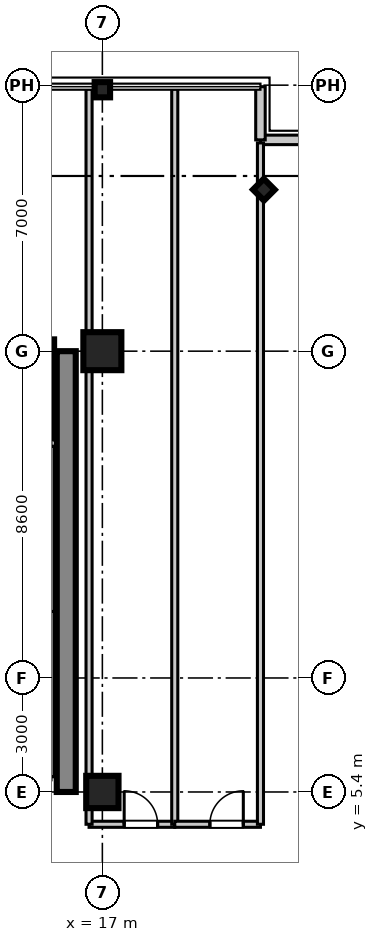
"""IFC4 building model, lengths in metres.
Left out: names, types, materials, properties, quantities, classifications, styles, units other than length and angle.
Written with IfcOpenShell. Run it as: python <this file> out.ifc"""

import sys

from ifc_helpers import new_model, si_unit, direction, frame, frame_2d, origin, origin_2d, place, context, subcontext, project, spatial, rectangle, i_section, extrude, source, transform, mapped, element, fill, save


model = new_model("IFC4")
c1 = context("Model", 3, precision=1e-05, world=origin(), true_north=direction((0.0, 1.0)))
c2 = subcontext(c1, "Body", "Model", "MODEL_VIEW")
j1 = project(units=[si_unit("LENGTHUNIT", "METRE"), si_unit("PLANEANGLEUNIT", "RADIAN")], contexts=[c1])
p1 = place(None, origin())
s1 = spatial("IfcSite", under=j1, at=p1, CompositionType="ELEMENT")
p2 = place(p1, origin())
s2 = spatial("IfcBuilding", under=s1, at=p2, CompositionType="ELEMENT")
p3 = place(p2, frame((0.0, 0.0, 219.7)))
s3 = spatial("IfcBuildingStorey", under=s2, at=p3, CompositionType="ELEMENT", Elevation=219.7)
m1 = source(origin(), c2, "Body", "SweptSolid", [
    extrude(rectangle(XDim=0.85, YDim=0.85, at=origin_2d()), origin(), (0.0, 0.0, 1.0), 3.655),
])
p4 = place(p3, frame((17.0, 5.4, 0.0), z_axis=(0.0, 0.0, 1.0), x_axis=(1.0, 0.0, 0.0)))
e1 = element("IfcColumn", 1, at=p4, inside=s3, PredefinedType="PILASTER", context=c2, shape_type="MappedRepresentation", body=[
    mapped(m1, transform((0.0, 0.0, 0.0), scale=1.0)),
])
m2 = source(origin(), c2, "Body", "SweptSolid", [
    extrude(rectangle(XDim=1.0, YDim=1.0, at=origin_2d()), origin(), (0.0, 0.0, 1.0), 3.655),
])
p5 = place(p3, frame((17.0, 17.0, 0.0), z_axis=(0.0, 0.0, 1.0), x_axis=(1.0, 0.0, 0.0)))
e2 = element("IfcColumn", 2, at=p5, inside=s3, PredefinedType="COLUMN", context=c2, shape_type="MappedRepresentation", body=[
    mapped(m2, transform((0.0, 0.0, 0.0), scale=1.0)),
])
m3 = source(origin(), c2, "Body", "SweptSolid", [
    extrude(i_section(OverallWidth=0.401, OverallDepth=0.406, WebThickness=0.016, FlangeThickness=0.025, at=origin_2d()), origin(), (0.0, 0.0, 1.0), 3.655),
])
for number, where, z_axis, x_axis in (
    (3, (17.0, 23.88, 0.0), (0.0, 0.0, 1.0), (0.0, 1.0, 0.0)),
    (4, (21.25, 21.25, 0.0), (0.0, 0.0, 1.0), (0.707, 0.707, 0.0)),
):
    element("IfcColumn", number, at=place(p3, frame(where, z_axis=z_axis, x_axis=x_axis)), inside=s3, PredefinedType="COLUMN", context=c2, shape_type="MappedRepresentation", body=[
        mapped(m3, transform((0.0, 0.0, 0.0), scale=1.0)),
    ])
m4 = source(origin(), c2, "Body", "SweptSolid", [
    extrude(rectangle(XDim=11.6, YDim=0.5, at=frame_2d((5.8, 0.0))), origin(), (0.0, 0.0, 1.0), 3.41),
])
p6 = place(p3, frame((16.05, 5.4, 0.0), z_axis=(0.0, 0.0, 1.0), x_axis=(0.0, 1.0, 0.0)))
e5 = element("IfcWall", 5, at=p6, inside=s3, PredefinedType="SHEAR", context=c2, shape_type="MappedRepresentation", body=[
    mapped(m4, transform((0.0, 0.0, 0.0), scale=1.0)),
])
m5 = source(origin(), c2, "Body", "SweptSolid", [
    extrude(rectangle(XDim=2.61, YDim=0.22, at=frame_2d((1.305, 0.0))), origin(), (0.0, 0.0, 1.0), 3.41),
])
p7 = place(p3, frame((15.62, 14.7, 0.0), z_axis=(0.0, 0.0, 1.0), x_axis=(0.0, 1.0, 0.0)))
e6 = element("IfcWall", 6, at=p7, inside=s3, PredefinedType="SHEAR", context=c2, shape_type="MappedRepresentation", body=[
    mapped(m5, transform((0.0, 0.0, 0.0), scale=1.0)),
])
m6 = source(origin(), c2, "Body", "SweptSolid", [
    extrude(rectangle(XDim=1.4, YDim=0.25, at=frame_2d((0.7, 0.0))), origin(), (0.0, 0.0, 1.0), 3.41),
])
p8 = place(p3, frame((21.16, 22.56, 0.0), z_axis=(0.0, 0.0, 1.0), x_axis=(1.0, 0.0, 0.0)))
e7 = element("IfcWall", 7, at=p8, inside=s3, PredefinedType="STANDARD", context=c2, shape_type="MappedRepresentation", body=[
    mapped(m6, transform((0.0, 0.0, 0.0), scale=1.0)),
])
m7 = source(origin(), c2, "Body", "SweptSolid", [
    extrude(rectangle(XDim=1.4, YDim=0.25, at=frame_2d((0.7, 0.0))), origin(), (0.0, 0.0, 1.0), 3.41),
])
p9 = place(p3, frame((21.16, 22.56, 0.0), z_axis=(0.0, 0.0, 1.0), x_axis=(0.0, 1.0, 0.0)))
e8 = element("IfcWall", 8, at=p9, inside=s3, PredefinedType="STANDARD", context=c2, shape_type="MappedRepresentation", body=[
    mapped(m7, transform((0.0, 0.0, 0.0), scale=1.0)),
])
m8 = source(origin(), c2, "Body", "SweptSolid", [
    extrude(rectangle(XDim=4.35, YDim=0.16, at=frame_2d((2.175, 0.0))), origin(), (0.0, 0.0, 1.0), 2.75),
])
p10 = place(p3, frame((15.65, 5.8, 0.0), z_axis=(0.0, 0.0, 1.0), x_axis=(0.0, 1.0, 0.0)))
e9 = element("IfcWall", 9, at=p10, inside=s3, PredefinedType="PARTITIONING", context=c2, shape_type="MappedRepresentation", body=[
    mapped(m8, transform((0.0, 0.0, 0.0), scale=1.0)),
])
m9 = source(origin(), c2, "Body", "SweptSolid", [
    extrude(rectangle(XDim=4.35, YDim=0.16, at=frame_2d((2.175, 0.0))), origin(), (0.0, 0.0, 1.0), 2.75),
])
p11 = place(p3, frame((15.65, 10.15, 0.0), z_axis=(0.0, 0.0, 1.0), x_axis=(0.0, 1.0, 0.0)))
e10 = element("IfcWall", 10, at=p11, inside=s3, PredefinedType="PARTITIONING", context=c2, shape_type="MappedRepresentation", body=[
    mapped(m9, transform((0.0, 0.0, 0.0), scale=1.0)),
])
m10 = source(origin(), c2, "Body", "SweptSolid", [
    extrude(rectangle(XDim=2.255, YDim=0.16, at=frame_2d((1.127, 0.0))), origin(), (0.0, 0.0, 1.0), 2.75),
])
p12 = place(p3, frame((16.65, 4.55, 0.0), z_axis=(0.0, 0.0, 1.0), x_axis=(1.0, 0.0, 0.0)))
e11 = element("IfcWall", 11, at=p12, inside=s3, PredefinedType="PARTITIONING", context=c2, shape_type="MappedRepresentation", body=[
    mapped(m10, transform((0.0, 0.0, 0.0), scale=1.0)),
])
p13 = place(p12, frame((0.924, 0.0, 0.0)))
e12 = element("IfcOpeningElement", 12, at=p13, cuts=e11, PredefinedType="OPENING", context=c2, shape_type="SweptSolid", body=[
    extrude(rectangle(XDim=0.88, YDim=2.1, at=frame_2d((0.44, 1.05))), frame((0.0, 0.09, 0.0), z_axis=(0.0, -1.0, 0.0), x_axis=(1.0, 0.0, 0.0)), (0.0, 0.0, 1.0), 0.18),
])
m11 = source(origin(), c2, "Body", "SweptSolid", [
    extrude(rectangle(XDim=19.35, YDim=0.16, at=frame_2d((9.675, 0.0))), origin(), (0.0, 0.0, 1.0), 2.75),
])
for number, where, z_axis, x_axis in (
    (13, (16.65, 4.55, 0.0), (0.0, 0.0, 1.0), (0.0, 1.0, 0.0)),
    (14, (18.905, 4.55, 0.0), (0.0, 0.0, 1.0), (0.0, 1.0, 0.0)),
):
    element("IfcWall", number, at=place(p3, frame(where, z_axis=z_axis, x_axis=x_axis)), inside=s3, PredefinedType="PARTITIONING", context=c2, shape_type="MappedRepresentation", body=[
        mapped(m11, transform((0.0, 0.0, 0.0), scale=1.0)),
    ])
m12 = source(origin(), c2, "Body", "SweptSolid", [
    extrude(rectangle(XDim=2.255, YDim=0.16, at=frame_2d((1.127, 0.0))), origin(), (0.0, 0.0, 1.0), 2.75),
])
p14 = place(p3, frame((18.905, 4.55, 0.0), z_axis=(0.0, 0.0, 1.0), x_axis=(1.0, 0.0, 0.0)))
e15 = element("IfcWall", 15, at=p14, inside=s3, PredefinedType="PARTITIONING", context=c2, shape_type="MappedRepresentation", body=[
    mapped(m12, transform((0.0, 0.0, 0.0), scale=1.0)),
])
p15 = place(p14, frame((0.924, 0.0, 0.0)))
e16 = element("IfcOpeningElement", 16, at=p15, cuts=e15, PredefinedType="OPENING", context=c2, shape_type="SweptSolid", body=[
    extrude(rectangle(XDim=0.88, YDim=2.1, at=frame_2d((0.44, 1.05))), frame((0.0, 0.09, 0.0), z_axis=(0.0, -1.0, 0.0), x_axis=(1.0, 0.0, 0.0)), (0.0, 0.0, 1.0), 0.18),
])
m13 = source(origin(), c2, "Body", "SweptSolid", [
    extrude(rectangle(XDim=17.93, YDim=0.16, at=frame_2d((8.965, 0.0))), origin(), (0.0, 0.0, 1.0), 2.75),
])
p16 = place(p3, frame((21.16, 4.55, 0.0), z_axis=(0.0, 0.0, 1.0), x_axis=(0.0, 1.0, 0.0)))
e17 = element("IfcWall", 17, at=p16, inside=s3, PredefinedType="PARTITIONING", context=c2, shape_type="MappedRepresentation", body=[
    mapped(m13, transform((0.0, 0.0, 0.0), scale=1.0)),
])
m14 = source(origin(), c2, "Body", "SweptSolid", [
    extrude(rectangle(XDim=0.88, YDim=2.1, at=frame_2d((0.44, 1.05))), frame((0.0, 0.025, 0.0), z_axis=(0.0, -1.0, 0.0), x_axis=(1.0, 0.0, 0.0)), (0.0, 0.0, 1.0), 0.05),
])
p17 = place(p13, origin())
e18 = element("IfcDoor", 18, at=p17, inside=s3, OperationType="SINGLE_SWING_LEFT", PredefinedType="DOOR", context=c2, shape_type="MappedRepresentation", body=[
    mapped(m14, transform((0.0, 0.0, 0.0), scale=1.0)),
])
fill(e12, e18)
p18 = place(p15, origin())
e19 = element("IfcDoor", 19, at=p18, inside=s3, OperationType="SINGLE_SWING_RIGHT", PredefinedType="DOOR", context=c2, shape_type="MappedRepresentation", body=[
    mapped(m14, transform((0.0, 0.0, 0.0), scale=1.0)),
])
fill(e16, e19)
save(model, sys.argv[1])
